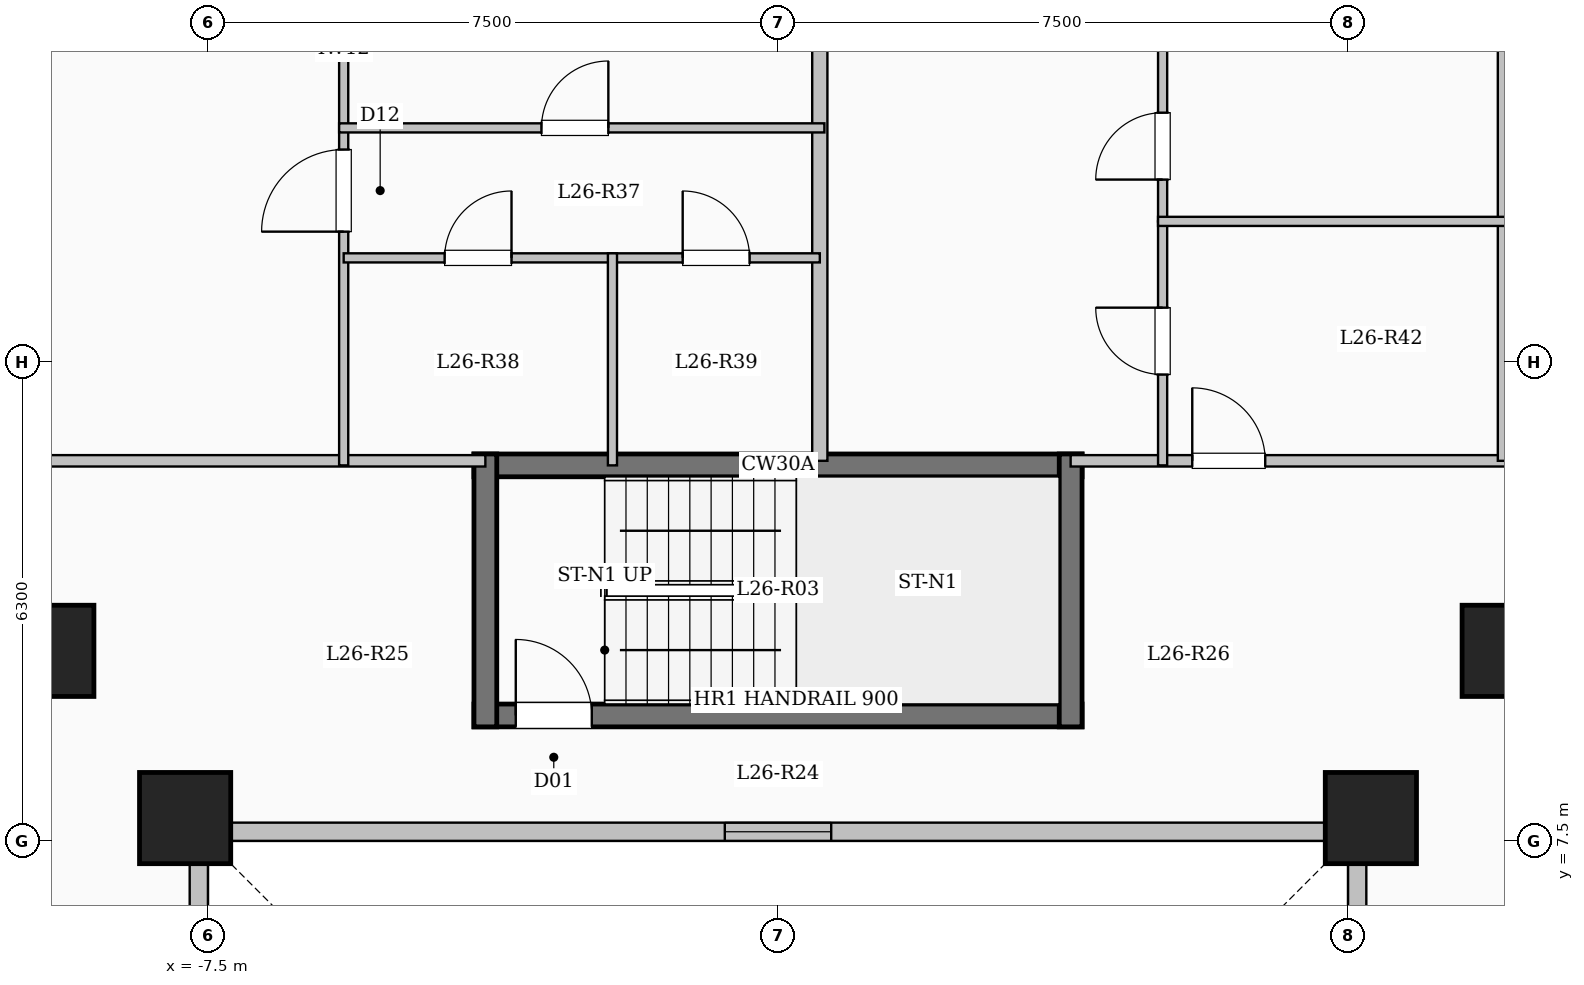
"""IFC4 building model, lengths in metres.
Left out: names, types, materials, properties, quantities, classifications, styles, units other than length and angle.
Written with IfcOpenShell. Run it as: python <this file> out.ifc"""

import sys

from ifc_helpers import new_model, si_unit, direction, frame, frame_2d, origin, origin_2d, place, context, subcontext, project, spatial, rectangle, extrude, element, fill, save


model = new_model("IFC4")
c1 = context("Model", 3, precision=1e-05, world=origin(), true_north=direction((0.0, 1.0)))
c2 = subcontext(c1, "Body", "Model", "MODEL_VIEW")
j1 = project(units=[si_unit("LENGTHUNIT", "METRE"), si_unit("PLANEANGLEUNIT", "RADIAN")], contexts=[c1])
p1 = place(None, origin())
s1 = spatial("IfcSite", under=j1, at=p1, CompositionType="ELEMENT")
p2 = place(p1, origin())
s2 = spatial("IfcBuilding", under=s1, at=p2, CompositionType="ELEMENT")
p3 = place(p2, frame((0.0, 0.0, 98.4)))
s3 = spatial("IfcBuildingStorey", under=s2, at=p3, CompositionType="ELEMENT", Elevation=98.4)
for number, where, z_axis, x_axis in (
    (1, (-7.8, 7.8, 0.0), (0.0, 0.0, 1.0), (1.0, 0.0, 0.0)),
    (2, (7.8, 7.8, 0.0), (0.0, 0.0, 1.0), (1.0, 0.0, 0.0)),
    (3, (-9.6, 10.0, 0.0), (0.0, 0.0, 1.0), (1.0, 0.0, 0.0)),
    (4, (9.6, 10.0, 0.0), (0.0, 0.0, 1.0), (1.0, 0.0, 0.0)),
):
    element("IfcColumn", number, at=place(p3, frame(where, z_axis=z_axis, x_axis=x_axis)), inside=s3, PredefinedType="COLUMN", context=c2, shape_type="SweptSolid", body=[
        extrude(rectangle(XDim=1.2, YDim=1.2, at=origin_2d()), origin(), (0.0, 0.0, 1.0), 3.35),
    ])
p4 = place(p3, frame((7.62, -7.62, 0.0), z_axis=(0.0, 0.0, 1.0), x_axis=(0.0, 1.0, 0.0)))
e5 = element("IfcWall", 5, at=p4, inside=s3, PredefinedType="SOLIDWALL", context=c2, shape_type="SweptSolid", body=[
    extrude(rectangle(XDim=15.24, YDim=0.24, at=frame_2d((7.62, 0.0))), origin(), (0.0, 0.0, 1.0), 3.1),
])
p5 = place(p4, frame((6.92, 0.0, 0.95)))
e6 = element("IfcOpeningElement", 6, at=p5, cuts=e5, PredefinedType="OPENING", context=c2, shape_type="SweptSolid", body=[
    extrude(rectangle(XDim=1.4, YDim=1.5, at=frame_2d((0.7, 0.75))), frame((0.0, 0.13, 0.0), z_axis=(0.0, -1.0, 0.0), x_axis=(1.0, 0.0, 0.0)), (0.0, 0.0, 1.0), 0.26),
])
p6 = place(p3, frame((7.62, 7.62, 0.0), z_axis=(0.0, 0.0, 1.0), x_axis=(-1.0, 0.0, 0.0)))
e7 = element("IfcWall", 7, at=p6, inside=s3, PredefinedType="SOLIDWALL", context=c2, shape_type="SweptSolid", body=[
    extrude(rectangle(XDim=15.24, YDim=0.24, at=frame_2d((7.62, 0.0))), origin(), (0.0, 0.0, 1.0), 3.1),
])
p7 = place(p6, frame((6.92, 0.0, 0.95)))
e8 = element("IfcOpeningElement", 8, at=p7, cuts=e7, PredefinedType="OPENING", context=c2, shape_type="SweptSolid", body=[
    extrude(rectangle(XDim=1.4, YDim=1.5, at=frame_2d((0.7, 0.75))), frame((0.0, 0.13, 0.0), z_axis=(0.0, -1.0, 0.0), x_axis=(1.0, 0.0, 0.0)), (0.0, 0.0, 1.0), 0.26),
])
p8 = place(p3, frame((-7.62, 7.62, 0.0), z_axis=(0.0, 0.0, 1.0), x_axis=(0.0, -1.0, 0.0)))
e9 = element("IfcWall", 9, at=p8, inside=s3, PredefinedType="SOLIDWALL", context=c2, shape_type="SweptSolid", body=[
    extrude(rectangle(XDim=15.24, YDim=0.24, at=frame_2d((7.62, 0.0))), origin(), (0.0, 0.0, 1.0), 3.1),
])
p9 = place(p8, frame((6.92, 0.0, 0.95)))
e10 = element("IfcOpeningElement", 10, at=p9, cuts=e9, PredefinedType="OPENING", context=c2, shape_type="SweptSolid", body=[
    extrude(rectangle(XDim=1.4, YDim=1.5, at=frame_2d((0.7, 0.75))), frame((0.0, 0.13, 0.0), z_axis=(0.0, -1.0, 0.0), x_axis=(1.0, 0.0, 0.0)), (0.0, 0.0, 1.0), 0.26),
])
p10 = place(p3, frame((-4.0, 12.44, 0.0), z_axis=(0.0, 0.0, 1.0), x_axis=(1.0, 0.0, 0.0)))
e11 = element("IfcWall", 11, at=p10, inside=s3, PredefinedType="SHEAR", context=c2, shape_type="SweptSolid", body=[
    extrude(rectangle(XDim=8.0, YDim=0.3, at=frame_2d((4.0, 0.0))), origin(), (0.0, 0.0, 1.0), 3.35),
])
p11 = place(p3, frame((-4.0, 9.15, 0.0), z_axis=(0.0, 0.0, 1.0), x_axis=(1.0, 0.0, 0.0)))
e12 = element("IfcWall", 12, at=p11, inside=s3, PredefinedType="SHEAR", context=c2, shape_type="SweptSolid", body=[
    extrude(rectangle(XDim=8.0, YDim=0.3, at=frame_2d((4.0, 0.0))), origin(), (0.0, 0.0, 1.0), 3.35),
])
p12 = place(p11, frame((0.55, 0.0, 0.0)))
e13 = element("IfcOpeningElement", 13, at=p12, cuts=e12, PredefinedType="OPENING", context=c2, shape_type="SweptSolid", body=[
    extrude(rectangle(XDim=1.0, YDim=2.15, at=frame_2d((0.5, 1.075))), frame((0.0, 0.16, 0.0), z_axis=(0.0, -1.0, 0.0), x_axis=(1.0, 0.0, 0.0)), (0.0, 0.0, 1.0), 0.32),
])
for number, where, z_axis, x_axis in (
    (14, (-3.85, 9.0, 0.0), (0.0, 0.0, 1.0), (0.0, 1.0, 0.0)),
    (15, (3.85, 9.0, 0.0), (0.0, 0.0, 1.0), (0.0, 1.0, 0.0)),
):
    element("IfcWall", number, at=place(p3, frame(where, z_axis=z_axis, x_axis=x_axis)), inside=s3, PredefinedType="SHEAR", context=c2, shape_type="SweptSolid", body=[
        extrude(rectangle(XDim=3.59, YDim=0.3, at=frame_2d((1.795, 0.0))), origin(), (0.0, 0.0, 1.0), 3.35),
    ])
p13 = place(p3, frame((-21.05, 12.5, 0.0), z_axis=(0.0, 0.0, 1.0), x_axis=(1.0, 0.0, 0.0)))
e16 = element("IfcWall", 16, at=p13, inside=s3, PredefinedType="PARTITIONING", context=c2, shape_type="SweptSolid", body=[
    extrude(rectangle(XDim=17.2, YDim=0.15, at=frame_2d((8.6, 0.0))), origin(), (0.0, 0.0, 1.0), 3.1),
])
p14 = place(p13, frame((0.7, 0.0, 0.0)))
e17 = element("IfcOpeningElement", 17, at=p14, cuts=e16, PredefinedType="OPENING", context=c2, shape_type="SweptSolid", body=[
    extrude(rectangle(XDim=0.96, YDim=2.15, at=frame_2d((0.48, 1.075))), frame((0.0, 0.085, 0.0), z_axis=(0.0, -1.0, 0.0), x_axis=(1.0, 0.0, 0.0)), (0.0, 0.0, 1.0), 0.17),
])
p15 = place(p13, frame((9.772, 0.0, 0.0)))
e18 = element("IfcOpeningElement", 18, at=p15, cuts=e16, PredefinedType="OPENING", context=c2, shape_type="SweptSolid", body=[
    extrude(rectangle(XDim=0.96, YDim=2.15, at=frame_2d((0.48, 1.075))), frame((0.0, 0.085, 0.0), z_axis=(0.0, -1.0, 0.0), x_axis=(1.0, 0.0, 0.0)), (0.0, 0.0, 1.0), 0.17),
])
p16 = place(p3, frame((3.85, 12.5, 0.0), z_axis=(0.0, 0.0, 1.0), x_axis=(1.0, 0.0, 0.0)))
e19 = element("IfcWall", 19, at=p16, inside=s3, PredefinedType="PARTITIONING", context=c2, shape_type="SweptSolid", body=[
    extrude(rectangle(XDim=17.2, YDim=0.15, at=frame_2d((8.6, 0.0))), origin(), (0.0, 0.0, 1.0), 3.1),
])
p17 = place(p16, frame((1.6, 0.0, 0.0)))
e20 = element("IfcOpeningElement", 20, at=p17, cuts=e19, PredefinedType="OPENING", context=c2, shape_type="SweptSolid", body=[
    extrude(rectangle(XDim=0.96, YDim=2.15, at=frame_2d((0.48, 1.075))), frame((0.0, 0.085, 0.0), z_axis=(0.0, -1.0, 0.0), x_axis=(1.0, 0.0, 0.0)), (0.0, 0.0, 1.0), 0.17),
])
p18 = place(p16, frame((6.42, 0.0, 0.0)))
e21 = element("IfcOpeningElement", 21, at=p18, cuts=e19, PredefinedType="OPENING", context=c2, shape_type="SweptSolid", body=[
    extrude(rectangle(XDim=0.96, YDim=2.15, at=frame_2d((0.48, 1.075))), frame((0.0, 0.085, 0.0), z_axis=(0.0, -1.0, 0.0), x_axis=(1.0, 0.0, 0.0)), (0.0, 0.0, 1.0), 0.17),
])
p19 = place(p3, frame((0.55, 12.5, 0.0), z_axis=(0.0, 0.0, 1.0), x_axis=(0.0, 1.0, 0.0)))
e22 = element("IfcWall", 22, at=p19, inside=s3, PredefinedType="SOLIDWALL", context=c2, shape_type="SweptSolid", body=[
    extrude(rectangle(XDim=11.08, YDim=0.2, at=frame_2d((5.54, 0.0))), origin(), (0.0, 0.0, 1.0), 3.1),
])
p20 = place(p3, frame((-5.714, 12.44, 0.0), z_axis=(0.0, 0.0, 1.0), x_axis=(0.0, 1.0, 0.0)))
e23 = element("IfcWall", 23, at=p20, inside=s3, PredefinedType="PARTITIONING", context=c2, shape_type="SweptSolid", body=[
    extrude(rectangle(XDim=10.964, YDim=0.12, at=frame_2d((5.482, 0.0))), origin(), (0.0, 0.0, 1.0), 3.1),
])
p21 = place(p20, frame((3.075, 0.0, 0.0)))
e24 = element("IfcOpeningElement", 24, at=p21, cuts=e23, PredefinedType="OPENING", context=c2, shape_type="SweptSolid", body=[
    extrude(rectangle(XDim=1.08, YDim=2.15, at=frame_2d((0.54, 1.075))), frame((0.0, 0.07, 0.0), z_axis=(0.0, -1.0, 0.0), x_axis=(1.0, 0.0, 0.0)), (0.0, 0.0, 1.0), 0.14),
])
p22 = place(p3, frame((-5.714, 15.17, 0.0), z_axis=(0.0, 0.0, 1.0), x_axis=(1.0, 0.0, 0.0)))
e25 = element("IfcWall", 25, at=p22, inside=s3, PredefinedType="PARTITIONING", context=c2, shape_type="SweptSolid", body=[
    extrude(rectangle(XDim=3.536, YDim=0.12, at=frame_2d((1.768, 0.0))), origin(), (0.0, 0.0, 1.0), 3.1),
])
p23 = place(p22, frame((1.328, 0.0, 0.0)))
e26 = element("IfcOpeningElement", 26, at=p23, cuts=e25, PredefinedType="OPENING", context=c2, shape_type="SweptSolid", body=[
    extrude(rectangle(XDim=0.88, YDim=2.1, at=frame_2d((0.44, 1.05))), frame((0.0, 0.07, 0.0), z_axis=(0.0, -1.0, 0.0), x_axis=(1.0, 0.0, 0.0)), (0.0, 0.0, 1.0), 0.14),
])
p24 = place(p3, frame((-2.178, 15.17, 0.0), z_axis=(0.0, 0.0, 1.0), x_axis=(1.0, 0.0, 0.0)))
e27 = element("IfcWall", 27, at=p24, inside=s3, PredefinedType="PARTITIONING", context=c2, shape_type="SweptSolid", body=[
    extrude(rectangle(XDim=2.728, YDim=0.12, at=frame_2d((1.364, 0.0))), origin(), (0.0, 0.0, 1.0), 3.1),
])
p25 = place(p24, frame((0.924, 0.0, 0.0)))
e28 = element("IfcOpeningElement", 28, at=p25, cuts=e27, PredefinedType="OPENING", context=c2, shape_type="SweptSolid", body=[
    extrude(rectangle(XDim=0.88, YDim=2.1, at=frame_2d((0.44, 1.05))), frame((0.0, 0.07, 0.0), z_axis=(0.0, -1.0, 0.0), x_axis=(1.0, 0.0, 0.0)), (0.0, 0.0, 1.0), 0.14),
])
p26 = place(p3, frame((-5.774, 16.88, 0.0), z_axis=(0.0, 0.0, 1.0), x_axis=(1.0, 0.0, 0.0)))
e29 = element("IfcWall", 29, at=p26, inside=s3, PredefinedType="PARTITIONING", context=c2, shape_type="SweptSolid", body=[
    extrude(rectangle(XDim=6.384, YDim=0.12, at=frame_2d((3.192, 0.0))), origin(), (0.0, 0.0, 1.0), 3.1),
])
p27 = place(p26, frame((2.662, 0.0, 0.0)))
e30 = element("IfcOpeningElement", 30, at=p27, cuts=e29, PredefinedType="OPENING", context=c2, shape_type="SweptSolid", body=[
    extrude(rectangle(XDim=0.88, YDim=2.1, at=frame_2d((0.44, 1.05))), frame((0.0, 0.07, 0.0), z_axis=(0.0, -1.0, 0.0), x_axis=(1.0, 0.0, 0.0)), (0.0, 0.0, 1.0), 0.14),
])
p28 = place(p3, frame((-2.178, 12.44, 0.0), z_axis=(0.0, 0.0, 1.0), x_axis=(0.0, 1.0, 0.0)))
e31 = element("IfcWall", 31, at=p28, inside=s3, PredefinedType="PARTITIONING", context=c2, shape_type="SweptSolid", body=[
    extrude(rectangle(XDim=2.79, YDim=0.12, at=frame_2d((1.395, 0.0))), origin(), (0.0, 0.0, 1.0), 3.1),
])
p29 = place(p3, frame((9.57, 12.5, 0.0), z_axis=(0.0, 0.0, 1.0), x_axis=(0.0, 1.0, 0.0)))
e32 = element("IfcWall", 32, at=p29, inside=s3, PredefinedType="SOLIDWALL", context=c2, shape_type="SweptSolid", body=[
    extrude(rectangle(XDim=9.953, YDim=0.2, at=frame_2d((4.977, 0.0))), origin(), (0.0, 0.0, 1.0), 3.1),
])
p30 = place(p3, frame((5.06, 12.44, 0.0), z_axis=(0.0, 0.0, 1.0), x_axis=(0.0, 1.0, 0.0)))
e33 = element("IfcWall", 33, at=p30, inside=s3, PredefinedType="PARTITIONING", context=c2, shape_type="SweptSolid", body=[
    extrude(rectangle(XDim=3.21, YDim=0.12, at=frame_2d((1.605, 0.0))), origin(), (0.0, 0.0, 1.0), 3.1),
])
p31 = place(p30, frame((1.195, 0.0, 0.0)))
e34 = element("IfcOpeningElement", 34, at=p31, cuts=e33, PredefinedType="OPENING", context=c2, shape_type="SweptSolid", body=[
    extrude(rectangle(XDim=0.88, YDim=2.1, at=frame_2d((0.44, 1.05))), frame((0.0, 0.07, 0.0), z_axis=(0.0, -1.0, 0.0), x_axis=(1.0, 0.0, 0.0)), (0.0, 0.0, 1.0), 0.14),
])
p32 = place(p3, frame((5.06, 15.65, 0.0), z_axis=(0.0, 0.0, 1.0), x_axis=(0.0, 1.0, 0.0)))
e35 = element("IfcWall", 35, at=p32, inside=s3, PredefinedType="PARTITIONING", context=c2, shape_type="SweptSolid", body=[
    extrude(rectangle(XDim=7.915, YDim=0.12, at=frame_2d((3.958, 0.0))), origin(), (0.0, 0.0, 1.0), 3.1),
])
p33 = place(p32, frame((0.55, 0.0, 0.0)))
e36 = element("IfcOpeningElement", 36, at=p33, cuts=e35, PredefinedType="OPENING", context=c2, shape_type="SweptSolid", body=[
    extrude(rectangle(XDim=0.88, YDim=2.1, at=frame_2d((0.44, 1.05))), frame((0.0, 0.07, 0.0), z_axis=(0.0, -1.0, 0.0), x_axis=(1.0, 0.0, 0.0)), (0.0, 0.0, 1.0), 0.14),
])
p34 = place(p3, frame((5.0, 15.65, 0.0), z_axis=(0.0, 0.0, 1.0), x_axis=(1.0, 0.0, 0.0)))
e37 = element("IfcWall", 37, at=p34, inside=s3, PredefinedType="PARTITIONING", context=c2, shape_type="SweptSolid", body=[
    extrude(rectangle(XDim=4.63, YDim=0.12, at=frame_2d((2.315, 0.0))), origin(), (0.0, 0.0, 1.0), 3.1),
])
p35 = place(p7, origin())
e38 = element("IfcWindow", 38, at=p35, inside=s3, PartitioningType="SINGLE_PANEL", PredefinedType="WINDOW", context=c2, shape_type="SweptSolid", body=[
    extrude(rectangle(XDim=1.4, YDim=1.5, at=frame_2d((0.7, 0.75))), frame((0.0, 0.03, 0.0), z_axis=(0.0, -1.0, 0.0), x_axis=(1.0, 0.0, 0.0)), (0.0, 0.0, 1.0), 0.06),
])
fill(e8, e38)
p36 = place(p12, origin())
e39 = element("IfcDoor", 39, at=p36, inside=s3, OperationType="SINGLE_SWING_LEFT", PredefinedType="DOOR", context=c2, shape_type="SweptSolid", body=[
    extrude(rectangle(XDim=1.0, YDim=2.15, at=frame_2d((0.5, 1.075))), frame((0.0, 0.025, 0.0), z_axis=(0.0, -1.0, 0.0), x_axis=(1.0, 0.0, 0.0)), (0.0, 0.0, 1.0), 0.05),
])
fill(e13, e39)
p37 = place(p21, origin())
e40 = element("IfcDoor", 40, at=p37, inside=s3, OperationType="SINGLE_SWING_LEFT", PredefinedType="DOOR", context=c2, shape_type="SweptSolid", body=[
    extrude(rectangle(XDim=1.08, YDim=2.15, at=frame_2d((0.54, 1.075))), frame((0.0, 0.025, 0.0), z_axis=(0.0, -1.0, 0.0), x_axis=(1.0, 0.0, 0.0)), (0.0, 0.0, 1.0), 0.05),
])
fill(e24, e40)
p38 = place(p23, origin())
e41 = element("IfcDoor", 41, at=p38, inside=s3, OperationType="SINGLE_SWING_RIGHT", PredefinedType="DOOR", context=c2, shape_type="SweptSolid", body=[
    extrude(rectangle(XDim=0.88, YDim=2.1, at=frame_2d((0.44, 1.05))), frame((0.0, 0.025, 0.0), z_axis=(0.0, -1.0, 0.0), x_axis=(1.0, 0.0, 0.0)), (0.0, 0.0, 1.0), 0.05),
])
fill(e26, e41)
p39 = place(p25, origin())
e42 = element("IfcDoor", 42, at=p39, inside=s3, OperationType="SINGLE_SWING_LEFT", PredefinedType="DOOR", context=c2, shape_type="SweptSolid", body=[
    extrude(rectangle(XDim=0.88, YDim=2.1, at=frame_2d((0.44, 1.05))), frame((0.0, 0.025, 0.0), z_axis=(0.0, -1.0, 0.0), x_axis=(1.0, 0.0, 0.0)), (0.0, 0.0, 1.0), 0.05),
])
fill(e28, e42)
p40 = place(p27, origin())
e43 = element("IfcDoor", 43, at=p40, inside=s3, OperationType="SINGLE_SWING_RIGHT", PredefinedType="DOOR", context=c2, shape_type="SweptSolid", body=[
    extrude(rectangle(XDim=0.88, YDim=2.1, at=frame_2d((0.44, 1.05))), frame((0.0, 0.025, 0.0), z_axis=(0.0, -1.0, 0.0), x_axis=(1.0, 0.0, 0.0)), (0.0, 0.0, 1.0), 0.05),
])
fill(e30, e43)
p41 = place(p17, origin())
e44 = element("IfcDoor", 44, at=p41, inside=s3, OperationType="SINGLE_SWING_LEFT", PredefinedType="DOOR", context=c2, shape_type="SweptSolid", body=[
    extrude(rectangle(XDim=0.96, YDim=2.15, at=frame_2d((0.48, 1.075))), frame((0.0, 0.025, 0.0), z_axis=(0.0, -1.0, 0.0), x_axis=(1.0, 0.0, 0.0)), (0.0, 0.0, 1.0), 0.05),
])
fill(e20, e44)
p42 = place(p31, origin())
e45 = element("IfcDoor", 45, at=p42, inside=s3, OperationType="SINGLE_SWING_RIGHT", PredefinedType="DOOR", context=c2, shape_type="SweptSolid", body=[
    extrude(rectangle(XDim=0.88, YDim=2.1, at=frame_2d((0.44, 1.05))), frame((0.0, 0.025, 0.0), z_axis=(0.0, -1.0, 0.0), x_axis=(1.0, 0.0, 0.0)), (0.0, 0.0, 1.0), 0.05),
])
fill(e34, e45)
p43 = place(p33, origin())
e46 = element("IfcDoor", 46, at=p43, inside=s3, OperationType="SINGLE_SWING_LEFT", PredefinedType="DOOR", context=c2, shape_type="SweptSolid", body=[
    extrude(rectangle(XDim=0.88, YDim=2.1, at=frame_2d((0.44, 1.05))), frame((0.0, 0.025, 0.0), z_axis=(0.0, -1.0, 0.0), x_axis=(1.0, 0.0, 0.0)), (0.0, 0.0, 1.0), 0.05),
])
fill(e36, e46)
save(model, sys.argv[1])
